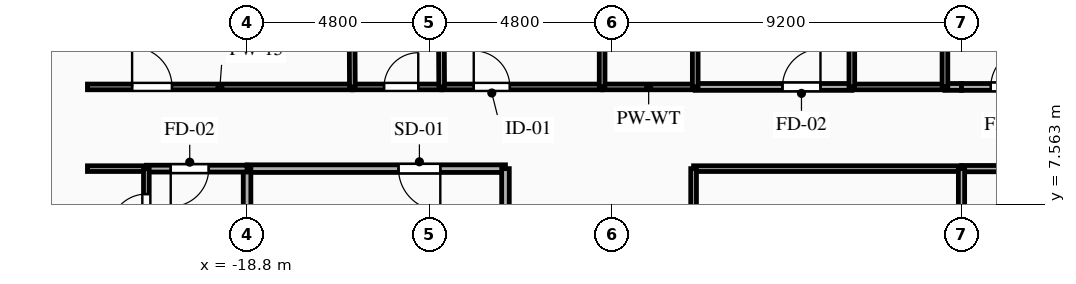
"""IFC4 building model, lengths in metres.
Left out: names, types, materials, properties, quantities, classifications, styles, units other than length and angle.
Written with IfcOpenShell. Run it as: python <this file> out.ifc"""

import sys

from ifc_helpers import new_model, si_unit, direction, frame, frame_2d, origin, place, context, subcontext, project, spatial, rectangle, extrude, element, fill, save


model = new_model("IFC4")
c1 = context("Model", 3, precision=1e-05, world=origin(), true_north=direction((0.0, 1.0)))
c2 = subcontext(c1, "Body", "Model", "MODEL_VIEW")
j1 = project(units=[si_unit("LENGTHUNIT", "METRE"), si_unit("PLANEANGLEUNIT", "RADIAN")], contexts=[c1])
p1 = place(None, origin())
s1 = spatial("IfcSite", under=j1, at=p1, CompositionType="ELEMENT")
p2 = place(p1, origin())
s2 = spatial("IfcBuilding", under=s1, at=p2, CompositionType="ELEMENT")
p3 = place(p2, frame((0.0, 0.0, 85.7)))
s3 = spatial("IfcBuildingStorey", under=s2, at=p3, CompositionType="ELEMENT", Elevation=85.7)
p4 = place(p3, frame((-12.0, 8.5, 0.0), z_axis=(0.0, 0.0, 1.0), x_axis=(-1.0, 0.0, 0.0)))
e1 = element("IfcWall", 1, at=p4, inside=s3, PredefinedType="PARTITIONING", context=c2, shape_type="SweptSolid", body=[
    extrude(rectangle(XDim=6.8, YDim=0.2, at=frame_2d((3.4, 0.0))), origin(), (0.0, 0.0, 1.0), 3.045),
])
p5 = place(p4, frame((1.715, 0.0, 0.0)))
e2 = element("IfcOpeningElement", 2, at=p5, cuts=e1, PredefinedType="OPENING", context=c2, shape_type="SweptSolid", body=[
    extrude(rectangle(XDim=1.1, YDim=2.15, at=frame_2d((0.55, 1.075))), frame((0.0, 0.11, 0.0), z_axis=(0.0, -1.0, 0.0), x_axis=(1.0, 0.0, 0.0)), (0.0, 0.0, 1.0), 0.22),
])
p6 = place(p3, frame((-12.0, 5.6, 0.0), z_axis=(0.0, 0.0, 1.0), x_axis=(0.0, 1.0, 0.0)))
e3 = element("IfcWall", 3, at=p6, inside=s3, PredefinedType="PARTITIONING", context=c2, shape_type="SweptSolid", body=[
    extrude(rectangle(XDim=2.9, YDim=0.2, at=frame_2d((1.45, 0.0))), origin(), (0.0, 0.0, 1.0), 3.045),
])
p7 = place(p3, frame((-18.8, 8.5, 0.0), z_axis=(0.0, 0.0, 1.0), x_axis=(0.0, -1.0, 0.0)))
e4 = element("IfcWall", 4, at=p7, inside=s3, PredefinedType="PARTITIONING", context=c2, shape_type="SweptSolid", body=[
    extrude(rectangle(XDim=2.9, YDim=0.2, at=frame_2d((1.45, 0.0))), origin(), (0.0, 0.0, 1.0), 2.53),
])
p8 = place(p3, frame((-18.8, 8.5, 0.0), z_axis=(0.0, 0.0, 1.0), x_axis=(-1.0, 0.0, 0.0)))
e5 = element("IfcWall", 5, at=p8, inside=s3, PredefinedType="PARTITIONING", context=c2, shape_type="SweptSolid", body=[
    extrude(rectangle(XDim=2.65, YDim=0.18, at=frame_2d((1.325, 0.0))), origin(), (0.0, 0.0, 1.0), 3.045),
])
p9 = place(p8, frame((1.009, 0.0, 0.0)))
e6 = element("IfcOpeningElement", 6, at=p9, cuts=e5, PredefinedType="OPENING", context=c2, shape_type="SweptSolid", body=[
    extrude(rectangle(XDim=1.0, YDim=2.15, at=frame_2d((0.5, 1.075))), frame((0.0, 0.1, 0.0), z_axis=(0.0, -1.0, 0.0), x_axis=(1.0, 0.0, 0.0)), (0.0, 0.0, 1.0), 0.2),
])
p10 = place(p3, frame((-21.45, 8.5, 0.0), z_axis=(0.0, 0.0, 1.0), x_axis=(-1.0, 0.0, 0.0)))
e7 = element("IfcWall", 7, at=p10, inside=s3, PredefinedType="PARTITIONING", context=c2, shape_type="SweptSolid", body=[
    extrude(rectangle(XDim=1.55, YDim=0.15, at=frame_2d((0.775, 0.0))), origin(), (0.0, 0.0, 1.0), 3.045),
])
p11 = place(p3, frame((-23.0, 10.65, 0.0), z_axis=(0.0, 0.0, 1.0), x_axis=(1.0, 0.0, 0.0)))
e8 = element("IfcWall", 8, at=p11, inside=s3, PredefinedType="PARTITIONING", context=c2, shape_type="SweptSolid", body=[
    extrude(rectangle(XDim=6.971, YDim=0.15, at=frame_2d((3.485, 0.0))), origin(), (0.0, 0.0, 1.0), 3.045),
])
p12 = place(p11, frame((1.175, 0.0, 0.0)))
e9 = element("IfcOpeningElement", 9, at=p12, cuts=e8, PredefinedType="OPENING", context=c2, shape_type="SweptSolid", body=[
    extrude(rectangle(XDim=1.05, YDim=2.15, at=frame_2d((0.525, 1.075))), frame((0.0, 0.085, 0.0), z_axis=(0.0, -1.0, 0.0), x_axis=(1.0, 0.0, 0.0)), (0.0, 0.0, 1.0), 0.17),
])
p13 = place(p3, frame((-16.029, 10.65, 0.0), z_axis=(0.0, 0.0, 1.0), x_axis=(1.0, 0.0, 0.0)))
e10 = element("IfcWall", 10, at=p13, inside=s3, PredefinedType="PLUMBINGWALL", context=c2, shape_type="SweptSolid", body=[
    extrude(rectangle(XDim=2.35, YDim=0.15, at=frame_2d((1.175, 0.0))), origin(), (0.0, 0.0, 1.0), 3.045),
])
p14 = place(p13, frame((0.834, 0.0, 0.0)))
e11 = element("IfcOpeningElement", 11, at=p14, cuts=e10, PredefinedType="OPENING", context=c2, shape_type="SweptSolid", body=[
    extrude(rectangle(XDim=0.9, YDim=2.1, at=frame_2d((0.45, 1.05))), frame((0.0, 0.085, 0.0), z_axis=(0.0, -1.0, 0.0), x_axis=(1.0, 0.0, 0.0)), (0.0, 0.0, 1.0), 0.17),
])
p15 = place(p3, frame((-13.679, 10.65, 0.0), z_axis=(0.0, 0.0, 1.0), x_axis=(1.0, 0.0, 0.0)))
e12 = element("IfcWall", 12, at=p15, inside=s3, PredefinedType="PARTITIONING", context=c2, shape_type="SweptSolid", body=[
    extrude(rectangle(XDim=4.222, YDim=0.15, at=frame_2d((2.111, 0.0))), origin(), (0.0, 0.0, 1.0), 3.045),
])
p16 = place(p15, frame((0.844, 0.0, 0.0)))
e13 = element("IfcOpeningElement", 13, at=p16, cuts=e12, PredefinedType="OPENING", context=c2, shape_type="SweptSolid", body=[
    extrude(rectangle(XDim=0.95, YDim=2.1, at=frame_2d((0.475, 1.05))), frame((0.0, 0.085, 0.0), z_axis=(0.0, -1.0, 0.0), x_axis=(1.0, 0.0, 0.0)), (0.0, 0.0, 1.0), 0.17),
])
p17 = place(p3, frame((-7.007, 10.65, 0.0), z_axis=(0.0, 0.0, 1.0), x_axis=(1.0, 0.0, 0.0)))
e14 = element("IfcWall", 14, at=p17, inside=s3, PredefinedType="PARTITIONING", context=c2, shape_type="SweptSolid", body=[
    extrude(rectangle(XDim=4.121, YDim=0.18, at=frame_2d((2.061, 0.0))), origin(), (0.0, 0.0, 1.0), 3.045),
])
p18 = place(p17, frame((2.296, 0.0, 0.0)))
e15 = element("IfcOpeningElement", 15, at=p18, cuts=e14, PredefinedType="OPENING", context=c2, shape_type="SweptSolid", body=[
    extrude(rectangle(XDim=1.0, YDim=2.15, at=frame_2d((0.5, 1.075))), frame((0.0, 0.1, 0.0), z_axis=(0.0, -1.0, 0.0), x_axis=(1.0, 0.0, 0.0)), (0.0, 0.0, 1.0), 0.2),
])
p19 = place(p3, frame((-9.457, 10.65, 0.0), z_axis=(0.0, 0.0, 1.0), x_axis=(1.0, 0.0, 0.0)))
e16 = element("IfcWall", 16, at=p19, inside=s3, PredefinedType="PLUMBINGWALL", context=c2, shape_type="SweptSolid", body=[
    extrude(rectangle(XDim=2.45, YDim=0.15, at=frame_2d((1.225, 0.0))), origin(), (0.0, 0.0, 1.0), 3.045),
])
p20 = place(p3, frame((-0.436, 10.65, 0.0), z_axis=(0.0, 0.0, 1.0), x_axis=(1.0, 0.0, 0.0)))
e17 = element("IfcWall", 17, at=p20, inside=s3, PredefinedType="PARTITIONING", context=c2, shape_type="SweptSolid", body=[
    extrude(rectangle(XDim=0.436, YDim=0.18, at=frame_2d((0.218, 0.0))), origin(), (0.0, 0.0, 1.0), 3.045),
])
p21 = place(p3, frame((-2.886, 10.65, 0.0), z_axis=(0.0, 0.0, 1.0), x_axis=(1.0, 0.0, 0.0)))
e18 = element("IfcWall", 18, at=p21, inside=s3, PredefinedType="PLUMBINGWALL", context=c2, shape_type="SweptSolid", body=[
    extrude(rectangle(XDim=2.45, YDim=0.15, at=frame_2d((1.225, 0.0))), origin(), (0.0, 0.0, 1.0), 3.045),
])
p22 = place(p3, frame((0.0, 8.5, 0.0), z_axis=(0.0, 0.0, 1.0), x_axis=(-1.0, 0.0, 0.0)))
e19 = element("IfcWall", 19, at=p22, inside=s3, PredefinedType="PARTITIONING", context=c2, shape_type="SweptSolid", body=[
    extrude(rectangle(XDim=7.05, YDim=0.15, at=frame_2d((3.525, 0.0))), origin(), (0.0, 0.0, 1.0), 3.045),
])
p23 = place(p3, frame((0.0, 10.65, 0.0), z_axis=(0.0, 0.0, 1.0), x_axis=(1.0, 0.0, 0.0)))
e20 = element("IfcWall", 20, at=p23, inside=s3, PredefinedType="PARTITIONING", context=c2, shape_type="SweptSolid", body=[
    extrude(rectangle(XDim=3.686, YDim=0.18, at=frame_2d((1.843, 0.0))), origin(), (0.0, 0.0, 1.0), 3.045),
])
p24 = place(p23, frame((0.771, 0.0, 0.0)))
e21 = element("IfcOpeningElement", 21, at=p24, cuts=e20, PredefinedType="OPENING", context=c2, shape_type="SweptSolid", body=[
    extrude(rectangle(XDim=1.0, YDim=2.15, at=frame_2d((0.5, 1.075))), frame((0.0, 0.1, 0.0), z_axis=(0.0, -1.0, 0.0), x_axis=(1.0, 0.0, 0.0)), (0.0, 0.0, 1.0), 0.2),
])
p25 = place(p3, frame((7.05, 8.5, 0.0), z_axis=(0.0, 0.0, 1.0), x_axis=(-1.0, 0.0, 0.0)))
e22 = element("IfcWall", 22, at=p25, inside=s3, PredefinedType="PARTITIONING", context=c2, shape_type="SweptSolid", body=[
    extrude(rectangle(XDim=7.05, YDim=0.165, at=frame_2d((3.525, 0.0))), origin(), (0.0, 0.0, 1.0), 3.045),
])
p26 = place(p25, frame((4.728, 0.0, 0.0)))
e23 = element("IfcOpeningElement", 23, at=p26, cuts=e22, PredefinedType="OPENING", context=c2, shape_type="SweptSolid", body=[
    extrude(rectangle(XDim=1.15, YDim=2.15, at=frame_2d((0.575, 1.075))), frame((0.0, 0.093, 0.0), z_axis=(0.0, -1.0, 0.0), x_axis=(1.0, 0.0, 0.0)), (0.0, 0.0, 1.0), 0.185),
])
p27 = place(p3, frame((-7.05, 8.5, 0.0), z_axis=(0.0, 0.0, 1.0), x_axis=(0.0, -1.0, 0.0)))
e24 = element("IfcWall", 24, at=p27, inside=s3, PredefinedType="PARTITIONING", context=c2, shape_type="SweptSolid", body=[
    extrude(rectangle(XDim=14.1, YDim=0.15, at=frame_2d((7.05, 0.0))), origin(), (0.0, 0.0, 1.0), 3.045),
])
p28 = place(p27, frame((8.011, 0.0, 0.0)))
e25 = element("IfcOpeningElement", 25, at=p28, cuts=e24, PredefinedType="OPENING", context=c2, shape_type="SweptSolid", body=[
    extrude(rectangle(XDim=1.05, YDim=2.15, at=frame_2d((0.525, 1.075))), frame((0.0, 0.085, 0.0), z_axis=(0.0, -1.0, 0.0), x_axis=(1.0, 0.0, 0.0)), (0.0, 0.0, 1.0), 0.17),
])
p29 = place(p3, frame((-21.45, 5.68, 0.0), z_axis=(0.0, 0.0, 1.0), x_axis=(0.0, 1.0, 0.0)))
e26 = element("IfcWall", 26, at=p29, inside=s3, PredefinedType="PARTITIONING", context=c2, shape_type="SweptSolid", body=[
    extrude(rectangle(XDim=2.82, YDim=0.15, at=frame_2d((1.41, 0.0))), origin(), (0.0, 0.0, 1.0), 3.045),
])
p30 = place(p29, frame((1.201, 0.0, 0.0)))
e27 = element("IfcOpeningElement", 27, at=p30, cuts=e26, PredefinedType="OPENING", context=c2, shape_type="SweptSolid", body=[
    extrude(rectangle(XDim=0.95, YDim=2.1, at=frame_2d((0.475, 1.05))), frame((0.0, 0.085, 0.0), z_axis=(0.0, -1.0, 0.0), x_axis=(1.0, 0.0, 0.0)), (0.0, 0.0, 1.0), 0.17),
])
p31 = place(p3, frame((-16.073, 18.746, 0.0), z_axis=(0.0, 0.0, 1.0), x_axis=(0.005428146808, -0.999985267503, 0.0)))
e28 = element("IfcWall", 28, at=p31, inside=s3, PredefinedType="PLUMBINGWALL", context=c2, shape_type="SweptSolid", body=[
    extrude(rectangle(XDim=8.096, YDim=0.15, at=frame_2d((4.048, 0.0))), origin(), (0.0, 0.0, 1.0), 3.045),
])
p32 = place(p3, frame((-13.723, 18.992, 0.0), z_axis=(0.0, 0.0, 1.0), x_axis=(0.005267551513, -0.999986126354, 0.0)))
e29 = element("IfcWall", 29, at=p32, inside=s3, PredefinedType="PLUMBINGWALL", context=c2, shape_type="SweptSolid", body=[
    extrude(rectangle(XDim=8.343, YDim=0.15, at=frame_2d((4.171, 0.0))), origin(), (0.0, 0.0, 1.0), 3.045),
])
for number, where, z_axis, x_axis in (
    (30, (-9.457, 12.8, 0.0), (0.0, 0.0, 1.0), (0.0, -1.0, 0.0)),
    (31, (-7.007, 10.65, 0.0), (0.0, 0.0, 1.0), (0.0, 1.0, 0.0)),
    (32, (-2.886, 12.8, 0.0), (0.0, 0.0, 1.0), (0.0, -1.0, 0.0)),
    (33, (-0.436, 10.65, 0.0), (0.0, 0.0, 1.0), (0.0, 1.0, 0.0)),
):
    element("IfcWall", number, at=place(p3, frame(where, z_axis=z_axis, x_axis=x_axis)), inside=s3, PredefinedType="PLUMBINGWALL", context=c2, shape_type="SweptSolid", body=[
        extrude(rectangle(XDim=2.15, YDim=0.15, at=frame_2d((1.075, 0.0))), origin(), (0.0, 0.0, 1.0), 3.045),
    ])
p33 = place(p3, frame((0.0, 8.5, 0.0), z_axis=(0.0, 0.0, 1.0), x_axis=(0.0, -1.0, 0.0)))
e34 = element("IfcWall", 34, at=p33, inside=s3, PredefinedType="PARTITIONING", context=c2, shape_type="SweptSolid", body=[
    extrude(rectangle(XDim=7.05, YDim=0.165, at=frame_2d((3.525, 0.0))), origin(), (0.0, 0.0, 1.0), 3.045),
])
p34 = place(p5, origin())
e35 = element("IfcDoor", 35, at=p34, inside=s3, OperationType="SINGLE_SWING_LEFT", PredefinedType="DOOR", context=c2, shape_type="SweptSolid", body=[
    extrude(rectangle(XDim=1.1, YDim=2.15, at=frame_2d((0.55, 1.075))), frame((0.0, 0.025, 0.0), z_axis=(0.0, -1.0, 0.0), x_axis=(1.0, 0.0, 0.0)), (0.0, 0.0, 1.0), 0.05),
])
fill(e2, e35)
p35 = place(p9, origin())
e36 = element("IfcDoor", 36, at=p35, inside=s3, OperationType="SINGLE_SWING_RIGHT", PredefinedType="DOOR", context=c2, shape_type="SweptSolid", body=[
    extrude(rectangle(XDim=1.0, YDim=2.15, at=frame_2d((0.5, 1.075))), frame((0.0, 0.025, 0.0), z_axis=(0.0, -1.0, 0.0), x_axis=(1.0, 0.0, 0.0)), (0.0, 0.0, 1.0), 0.05),
])
fill(e6, e36)
p36 = place(p12, origin())
e37 = element("IfcDoor", 37, at=p36, inside=s3, OperationType="SINGLE_SWING_LEFT", PredefinedType="DOOR", context=c2, shape_type="SweptSolid", body=[
    extrude(rectangle(XDim=1.05, YDim=2.15, at=frame_2d((0.525, 1.075))), frame((0.0, 0.025, 0.0), z_axis=(0.0, -1.0, 0.0), x_axis=(1.0, 0.0, 0.0)), (0.0, 0.0, 1.0), 0.05),
])
fill(e9, e37)
p37 = place(p14, origin())
e38 = element("IfcDoor", 38, at=p37, inside=s3, OperationType="SINGLE_SWING_RIGHT", PredefinedType="DOOR", context=c2, shape_type="SweptSolid", body=[
    extrude(rectangle(XDim=0.9, YDim=2.1, at=frame_2d((0.45, 1.05))), frame((0.0, 0.025, 0.0), z_axis=(0.0, -1.0, 0.0), x_axis=(1.0, 0.0, 0.0)), (0.0, 0.0, 1.0), 0.05),
])
fill(e11, e38)
p38 = place(p16, origin())
e39 = element("IfcDoor", 39, at=p38, inside=s3, OperationType="SINGLE_SWING_LEFT", PredefinedType="DOOR", context=c2, shape_type="SweptSolid", body=[
    extrude(rectangle(XDim=0.95, YDim=2.1, at=frame_2d((0.475, 1.05))), frame((0.0, 0.025, 0.0), z_axis=(0.0, -1.0, 0.0), x_axis=(1.0, 0.0, 0.0)), (0.0, 0.0, 1.0), 0.05),
])
fill(e13, e39)
p39 = place(p18, origin())
e40 = element("IfcDoor", 40, at=p39, inside=s3, OperationType="SINGLE_SWING_RIGHT", PredefinedType="DOOR", context=c2, shape_type="SweptSolid", body=[
    extrude(rectangle(XDim=1.0, YDim=2.15, at=frame_2d((0.5, 1.075))), frame((0.0, 0.025, 0.0), z_axis=(0.0, -1.0, 0.0), x_axis=(1.0, 0.0, 0.0)), (0.0, 0.0, 1.0), 0.05),
])
fill(e15, e40)
p40 = place(p24, origin())
e41 = element("IfcDoor", 41, at=p40, inside=s3, OperationType="SINGLE_SWING_RIGHT", PredefinedType="DOOR", context=c2, shape_type="SweptSolid", body=[
    extrude(rectangle(XDim=1.0, YDim=2.15, at=frame_2d((0.5, 1.075))), frame((0.0, 0.025, 0.0), z_axis=(0.0, -1.0, 0.0), x_axis=(1.0, 0.0, 0.0)), (0.0, 0.0, 1.0), 0.05),
])
fill(e21, e41)
p41 = place(p30, origin())
e42 = element("IfcDoor", 42, at=p41, inside=s3, OperationType="SINGLE_SWING_LEFT", PredefinedType="DOOR", context=c2, shape_type="SweptSolid", body=[
    extrude(rectangle(XDim=0.95, YDim=2.1, at=frame_2d((0.475, 1.05))), frame((0.0, 0.025, 0.0), z_axis=(0.0, -1.0, 0.0), x_axis=(1.0, 0.0, 0.0)), (0.0, 0.0, 1.0), 0.05),
])
fill(e27, e42)
save(model, sys.argv[1])
